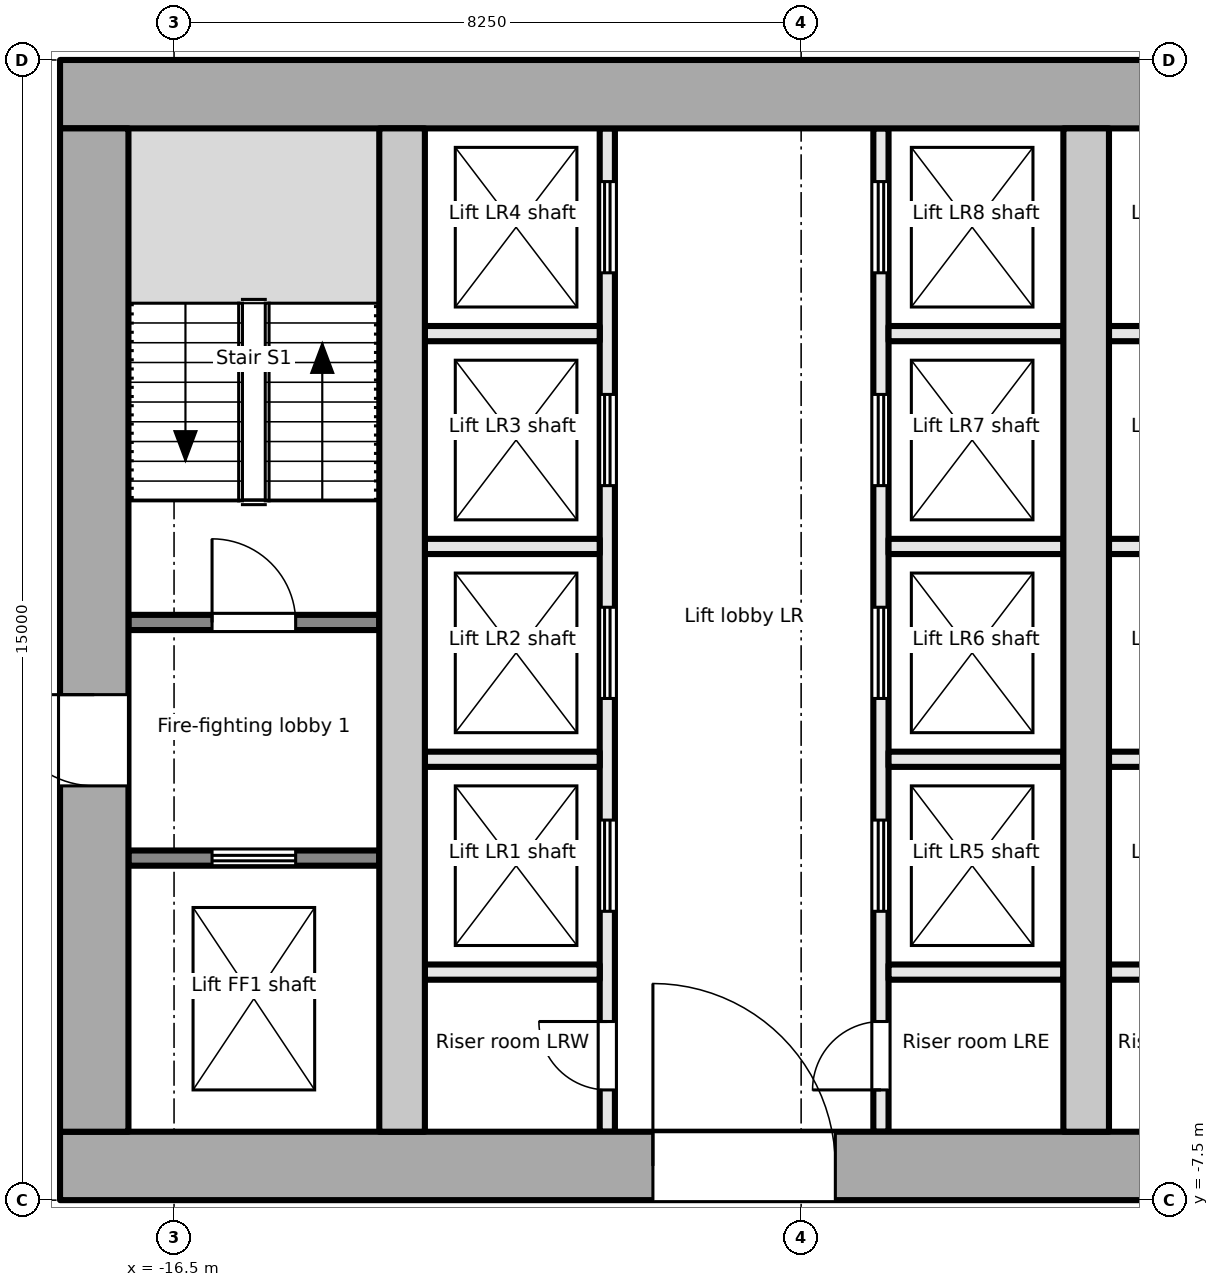
"""IFC4 building model, lengths in metres.
Left out: names, types, materials, properties, quantities, classifications, styles, units other than length and angle.
Written with IfcOpenShell. Run it as: python <this file> out.ifc"""

import sys

from ifc_helpers import new_model, si_unit, direction, frame, frame_2d, origin, place, context, subcontext, project, spatial, rectangle, extrude, element, fill, save


model = new_model("IFC4")
c1 = context("Model", 3, precision=1e-05, world=origin(), true_north=direction((0.0, 1.0)))
c2 = subcontext(c1, "Body", "Model", "MODEL_VIEW")
j1 = project(units=[si_unit("LENGTHUNIT", "METRE"), si_unit("PLANEANGLEUNIT", "RADIAN")], contexts=[c1])
p1 = place(None, origin())
s1 = spatial("IfcSite", under=j1, at=p1, CompositionType="ELEMENT")
p2 = place(p1, origin())
s2 = spatial("IfcBuilding", under=s1, at=p2, CompositionType="ELEMENT")
p3 = place(p2, frame((0.0, 0.0, 83.7)))
s3 = spatial("IfcBuildingStorey", under=s2, at=p3, CompositionType="ELEMENT", Elevation=83.7)
p4 = place(p3, frame((-18.0, -7.05, -0.2), z_axis=(0.0, 0.0, 1.0), x_axis=(1.0, 0.0, 0.0)))
e1 = element("IfcWall", 1, at=p4, inside=s3, PredefinedType="SHEAR", context=c2, shape_type="SweptSolid", body=[
    extrude(rectangle(XDim=36.0, YDim=0.9, at=frame_2d((18.0, 0.0))), origin(), (0.0, 0.0, 1.0), 4.0),
])
p5 = place(p4, frame((7.8, 0.0, 0.2)))
e2 = element("IfcOpeningElement", 2, at=p5, cuts=e1, PredefinedType="OPENING", context=c2, shape_type="SweptSolid", body=[
    extrude(rectangle(XDim=2.4, YDim=2.1, at=frame_2d((1.2, 1.05))), frame((0.0, 0.46, 0.0), z_axis=(0.0, -1.0, 0.0), x_axis=(1.0, 0.0, 0.0)), (0.0, 0.0, 1.0), 0.921),
])
p6 = place(p4, frame((17.4, 0.0, 0.2)))
e3 = element("IfcOpeningElement", 3, at=p6, cuts=e1, PredefinedType="OPENING", context=c2, shape_type="SweptSolid", body=[
    extrude(rectangle(XDim=1.2, YDim=2.1, at=frame_2d((0.6, 1.05))), frame((0.0, 0.46, 0.0), z_axis=(0.0, -1.0, 0.0), x_axis=(1.0, 0.0, 0.0)), (0.0, 0.0, 1.0), 0.921),
])
p7 = place(p4, frame((26.1, 0.0, 0.2)))
e4 = element("IfcOpeningElement", 4, at=p7, cuts=e1, PredefinedType="OPENING", context=c2, shape_type="SweptSolid", body=[
    extrude(rectangle(XDim=2.4, YDim=2.1, at=frame_2d((1.2, 1.05))), frame((0.0, 0.46, 0.0), z_axis=(0.0, -1.0, 0.0), x_axis=(1.0, 0.0, 0.0)), (0.0, 0.0, 1.0), 0.921),
])
p8 = place(p3, frame((-18.0, 7.05, -0.2), z_axis=(0.0, 0.0, 1.0), x_axis=(1.0, 0.0, 0.0)))
e5 = element("IfcWall", 5, at=p8, inside=s3, PredefinedType="SHEAR", context=c2, shape_type="SweptSolid", body=[
    extrude(rectangle(XDim=36.0, YDim=0.9, at=frame_2d((18.0, 0.0))), origin(), (0.0, 0.0, 1.0), 4.0),
])
p9 = place(p3, frame((-17.55, -6.6, -0.2), z_axis=(0.0, 0.0, 1.0), x_axis=(0.0, 1.0, 0.0)))
e6 = element("IfcWall", 6, at=p9, inside=s3, PredefinedType="SHEAR", context=c2, shape_type="SweptSolid", body=[
    extrude(rectangle(XDim=13.2, YDim=0.9, at=frame_2d((6.6, 0.0))), origin(), (0.0, 0.0, 1.0), 4.0),
])
p10 = place(p9, frame((4.55, 0.0, 0.2)))
e7 = element("IfcOpeningElement", 7, at=p10, cuts=e6, PredefinedType="OPENING", context=c2, shape_type="SweptSolid", body=[
    extrude(rectangle(XDim=1.2, YDim=2.1, at=frame_2d((0.6, 1.05))), frame((0.0, 0.46, 0.0), z_axis=(0.0, -1.0, 0.0), x_axis=(1.0, 0.0, 0.0)), (0.0, 0.0, 1.0), 0.921),
])
for number, where, z_axis, x_axis in (
    (8, (-13.5, -6.6, -0.2), (0.0, 0.0, 1.0), (0.0, 1.0, 0.0)),
    (9, (-4.5, -6.6, -0.2), (0.0, 0.0, 1.0), (0.0, 1.0, 0.0)),
):
    element("IfcWall", number, at=place(p3, frame(where, z_axis=z_axis, x_axis=x_axis)), inside=s3, PredefinedType="SHEAR", context=c2, shape_type="SweptSolid", body=[
        extrude(rectangle(XDim=13.2, YDim=0.6, at=frame_2d((6.6, 0.0))), origin(), (0.0, 0.0, 1.0), 4.0),
    ])
p11 = place(p3, frame((-17.1, -3.0, 0.0), z_axis=(0.0, 0.0, 1.0), x_axis=(1.0, 0.0, 0.0)))
e10 = element("IfcWall", 10, at=p11, inside=s3, PredefinedType="PARTITIONING", context=c2, shape_type="SweptSolid", body=[
    extrude(rectangle(XDim=3.3, YDim=0.2, at=frame_2d((1.65, 0.0))), origin(), (0.0, 0.0, 1.0), 3.8),
])
p12 = place(p11, frame((1.1, 0.0, 0.0)))
e11 = element("IfcOpeningElement", 11, at=p12, cuts=e10, PredefinedType="OPENING", context=c2, shape_type="SweptSolid", body=[
    extrude(rectangle(XDim=1.1, YDim=2.1, at=frame_2d((0.55, 1.05))), frame((0.0, 0.111, 0.0), z_axis=(0.0, -1.0, 0.0), x_axis=(1.0, 0.0, 0.0)), (0.0, 0.0, 1.0), 0.221),
])
p13 = place(p3, frame((-17.1, 0.1, 0.0), z_axis=(0.0, 0.0, 1.0), x_axis=(1.0, 0.0, 0.0)))
e12 = element("IfcWall", 12, at=p13, inside=s3, PredefinedType="PARTITIONING", context=c2, shape_type="SweptSolid", body=[
    extrude(rectangle(XDim=3.3, YDim=0.2, at=frame_2d((1.65, 0.0))), origin(), (0.0, 0.0, 1.0), 3.8),
])
p14 = place(p13, frame((1.1, 0.0, 0.0)))
e13 = element("IfcOpeningElement", 13, at=p14, cuts=e12, PredefinedType="OPENING", context=c2, shape_type="SweptSolid", body=[
    extrude(rectangle(XDim=1.1, YDim=2.1, at=frame_2d((0.55, 1.05))), frame((0.0, 0.111, 0.0), z_axis=(0.0, -1.0, 0.0), x_axis=(1.0, 0.0, 0.0)), (0.0, 0.0, 1.0), 0.221),
])
p15 = place(p3, frame((-10.8, -6.6, 0.0), z_axis=(0.0, 0.0, 1.0), x_axis=(0.0, 1.0, 0.0)))
e14 = element("IfcWall", 14, at=p15, inside=s3, PredefinedType="PARTITIONING", context=c2, shape_type="SweptSolid", body=[
    extrude(rectangle(XDim=13.2, YDim=0.2, at=frame_2d((6.6, 0.0))), origin(), (0.0, 0.0, 1.0), 3.8),
])
p16 = place(p15, frame((0.55, 0.0, 0.0)))
e15 = element("IfcOpeningElement", 15, at=p16, cuts=e14, PredefinedType="OPENING", context=c2, shape_type="SweptSolid", body=[
    extrude(rectangle(XDim=0.9, YDim=2.1, at=frame_2d((0.45, 1.05))), frame((0.0, 0.111, 0.0), z_axis=(0.0, -1.0, 0.0), x_axis=(1.0, 0.0, 0.0)), (0.0, 0.0, 1.0), 0.221),
])
p17 = place(p15, frame((2.9, 0.0, 0.0)))
e16 = element("IfcOpeningElement", 16, at=p17, cuts=e14, PredefinedType="OPENING", context=c2, shape_type="SweptSolid", body=[
    extrude(rectangle(XDim=1.2, YDim=2.1, at=frame_2d((0.6, 1.05))), frame((0.0, 0.111, 0.0), z_axis=(0.0, -1.0, 0.0), x_axis=(1.0, 0.0, 0.0)), (0.0, 0.0, 1.0), 0.221),
])
p18 = place(p15, frame((5.7, 0.0, 0.0)))
e17 = element("IfcOpeningElement", 17, at=p18, cuts=e14, PredefinedType="OPENING", context=c2, shape_type="SweptSolid", body=[
    extrude(rectangle(XDim=1.2, YDim=2.1, at=frame_2d((0.6, 1.05))), frame((0.0, 0.111, 0.0), z_axis=(0.0, -1.0, 0.0), x_axis=(1.0, 0.0, 0.0)), (0.0, 0.0, 1.0), 0.221),
])
p19 = place(p15, frame((8.5, 0.0, 0.0)))
e18 = element("IfcOpeningElement", 18, at=p19, cuts=e14, PredefinedType="OPENING", context=c2, shape_type="SweptSolid", body=[
    extrude(rectangle(XDim=1.2, YDim=2.1, at=frame_2d((0.6, 1.05))), frame((0.0, 0.111, 0.0), z_axis=(0.0, -1.0, 0.0), x_axis=(1.0, 0.0, 0.0)), (0.0, 0.0, 1.0), 0.221),
])
p20 = place(p15, frame((11.3, 0.0, 0.0)))
e19 = element("IfcOpeningElement", 19, at=p20, cuts=e14, PredefinedType="OPENING", context=c2, shape_type="SweptSolid", body=[
    extrude(rectangle(XDim=1.2, YDim=2.1, at=frame_2d((0.6, 1.05))), frame((0.0, 0.111, 0.0), z_axis=(0.0, -1.0, 0.0), x_axis=(1.0, 0.0, 0.0)), (0.0, 0.0, 1.0), 0.221),
])
p21 = place(p3, frame((-7.2, -6.6, 0.0), z_axis=(0.0, 0.0, 1.0), x_axis=(0.0, 1.0, 0.0)))
e20 = element("IfcWall", 20, at=p21, inside=s3, PredefinedType="PARTITIONING", context=c2, shape_type="SweptSolid", body=[
    extrude(rectangle(XDim=13.2, YDim=0.2, at=frame_2d((6.6, 0.0))), origin(), (0.0, 0.0, 1.0), 3.8),
])
p22 = place(p21, frame((0.55, 0.0, 0.0)))
e21 = element("IfcOpeningElement", 21, at=p22, cuts=e20, PredefinedType="OPENING", context=c2, shape_type="SweptSolid", body=[
    extrude(rectangle(XDim=0.9, YDim=2.1, at=frame_2d((0.45, 1.05))), frame((0.0, 0.111, 0.0), z_axis=(0.0, -1.0, 0.0), x_axis=(1.0, 0.0, 0.0)), (0.0, 0.0, 1.0), 0.221),
])
p23 = place(p21, frame((2.9, 0.0, 0.0)))
e22 = element("IfcOpeningElement", 22, at=p23, cuts=e20, PredefinedType="OPENING", context=c2, shape_type="SweptSolid", body=[
    extrude(rectangle(XDim=1.2, YDim=2.1, at=frame_2d((0.6, 1.05))), frame((0.0, 0.111, 0.0), z_axis=(0.0, -1.0, 0.0), x_axis=(1.0, 0.0, 0.0)), (0.0, 0.0, 1.0), 0.221),
])
p24 = place(p21, frame((5.7, 0.0, 0.0)))
e23 = element("IfcOpeningElement", 23, at=p24, cuts=e20, PredefinedType="OPENING", context=c2, shape_type="SweptSolid", body=[
    extrude(rectangle(XDim=1.2, YDim=2.1, at=frame_2d((0.6, 1.05))), frame((0.0, 0.111, 0.0), z_axis=(0.0, -1.0, 0.0), x_axis=(1.0, 0.0, 0.0)), (0.0, 0.0, 1.0), 0.221),
])
p25 = place(p21, frame((8.5, 0.0, 0.0)))
e24 = element("IfcOpeningElement", 24, at=p25, cuts=e20, PredefinedType="OPENING", context=c2, shape_type="SweptSolid", body=[
    extrude(rectangle(XDim=1.2, YDim=2.1, at=frame_2d((0.6, 1.05))), frame((0.0, 0.111, 0.0), z_axis=(0.0, -1.0, 0.0), x_axis=(1.0, 0.0, 0.0)), (0.0, 0.0, 1.0), 0.221),
])
p26 = place(p21, frame((11.3, 0.0, 0.0)))
e25 = element("IfcOpeningElement", 25, at=p26, cuts=e20, PredefinedType="OPENING", context=c2, shape_type="SweptSolid", body=[
    extrude(rectangle(XDim=1.2, YDim=2.1, at=frame_2d((0.6, 1.05))), frame((0.0, 0.111, 0.0), z_axis=(0.0, -1.0, 0.0), x_axis=(1.0, 0.0, 0.0)), (0.0, 0.0, 1.0), 0.221),
])
for number, where, z_axis, x_axis in (
    (26, (-13.2, -1.7, 0.0), (0.0, 0.0, 1.0), (1.0, 0.0, 0.0)),
    (27, (-13.2, 1.1, 0.0), (0.0, 0.0, 1.0), (1.0, 0.0, 0.0)),
    (28, (-13.2, 3.9, 0.0), (0.0, 0.0, 1.0), (1.0, 0.0, 0.0)),
    (29, (-13.2, -4.5, 0.0), (0.0, 0.0, 1.0), (1.0, 0.0, 0.0)),
    (30, (-7.1, -1.7, 0.0), (0.0, 0.0, 1.0), (1.0, 0.0, 0.0)),
    (31, (-7.1, 1.1, 0.0), (0.0, 0.0, 1.0), (1.0, 0.0, 0.0)),
    (32, (-7.1, 3.9, 0.0), (0.0, 0.0, 1.0), (1.0, 0.0, 0.0)),
    (33, (-7.1, -4.5, 0.0), (0.0, 0.0, 1.0), (1.0, 0.0, 0.0)),
    (34, (-4.2, -1.7, 0.0), (0.0, 0.0, 1.0), (1.0, 0.0, 0.0)),
    (35, (-4.2, 1.1, 0.0), (0.0, 0.0, 1.0), (1.0, 0.0, 0.0)),
    (36, (-4.2, 3.9, 0.0), (0.0, 0.0, 1.0), (1.0, 0.0, 0.0)),
    (37, (-4.2, -4.5, 0.0), (0.0, 0.0, 1.0), (1.0, 0.0, 0.0)),
):
    element("IfcWall", number, at=place(p3, frame(where, z_axis=z_axis, x_axis=x_axis)), inside=s3, PredefinedType="PARTITIONING", context=c2, shape_type="SweptSolid", body=[
        extrude(rectangle(XDim=2.3, YDim=0.2, at=frame_2d((1.15, 0.0))), origin(), (0.0, 0.0, 1.0), 3.8),
    ])
p27 = place(p12, origin())
e38 = element("IfcDoor", 38, at=p27, inside=s3, OperationType="DOUBLE_DOOR_SLIDING", PredefinedType="DOOR", context=c2, shape_type="SweptSolid", body=[
    extrude(rectangle(XDim=1.1, YDim=2.1, at=frame_2d((0.55, 1.05))), frame((0.0, 0.025, 0.0), z_axis=(0.0, -1.0, 0.0), x_axis=(1.0, 0.0, 0.0)), (0.0, 0.0, 1.0), 0.05),
])
fill(e11, e38)
p28 = place(p10, origin())
e39 = element("IfcDoor", 39, at=p28, inside=s3, OperationType="SINGLE_SWING_RIGHT", PredefinedType="DOOR", context=c2, shape_type="SweptSolid", body=[
    extrude(rectangle(XDim=1.2, YDim=2.1, at=frame_2d((0.6, 1.05))), frame((0.0, 0.025, 0.0), z_axis=(0.0, -1.0, 0.0), x_axis=(1.0, 0.0, 0.0)), (0.0, 0.0, 1.0), 0.05),
])
fill(e7, e39)
p29 = place(p14, origin())
e40 = element("IfcDoor", 40, at=p29, inside=s3, OperationType="SINGLE_SWING_LEFT", PredefinedType="DOOR", context=c2, shape_type="SweptSolid", body=[
    extrude(rectangle(XDim=1.1, YDim=2.1, at=frame_2d((0.55, 1.05))), frame((0.0, 0.025, 0.0), z_axis=(0.0, -1.0, 0.0), x_axis=(1.0, 0.0, 0.0)), (0.0, 0.0, 1.0), 0.05),
])
fill(e13, e40)
p30 = place(p16, origin())
e41 = element("IfcDoor", 41, at=p30, inside=s3, OperationType="SINGLE_SWING_RIGHT", PredefinedType="DOOR", context=c2, shape_type="SweptSolid", body=[
    extrude(rectangle(XDim=0.9, YDim=2.1, at=frame_2d((0.45, 1.05))), frame((0.0, 0.025, 0.0), z_axis=(0.0, -1.0, 0.0), x_axis=(1.0, 0.0, 0.0)), (0.0, 0.0, 1.0), 0.05),
])
fill(e15, e41)
p31 = place(p17, origin())
e42 = element("IfcDoor", 42, at=p31, inside=s3, OperationType="DOUBLE_DOOR_SLIDING", PredefinedType="DOOR", context=c2, shape_type="SweptSolid", body=[
    extrude(rectangle(XDim=1.2, YDim=2.1, at=frame_2d((0.6, 1.05))), frame((0.0, 0.025, 0.0), z_axis=(0.0, -1.0, 0.0), x_axis=(1.0, 0.0, 0.0)), (0.0, 0.0, 1.0), 0.05),
])
fill(e16, e42)
p32 = place(p18, origin())
e43 = element("IfcDoor", 43, at=p32, inside=s3, OperationType="DOUBLE_DOOR_SLIDING", PredefinedType="DOOR", context=c2, shape_type="SweptSolid", body=[
    extrude(rectangle(XDim=1.2, YDim=2.1, at=frame_2d((0.6, 1.05))), frame((0.0, 0.025, 0.0), z_axis=(0.0, -1.0, 0.0), x_axis=(1.0, 0.0, 0.0)), (0.0, 0.0, 1.0), 0.05),
])
fill(e17, e43)
p33 = place(p19, origin())
e44 = element("IfcDoor", 44, at=p33, inside=s3, OperationType="DOUBLE_DOOR_SLIDING", PredefinedType="DOOR", context=c2, shape_type="SweptSolid", body=[
    extrude(rectangle(XDim=1.2, YDim=2.1, at=frame_2d((0.6, 1.05))), frame((0.0, 0.025, 0.0), z_axis=(0.0, -1.0, 0.0), x_axis=(1.0, 0.0, 0.0)), (0.0, 0.0, 1.0), 0.05),
])
fill(e18, e44)
p34 = place(p20, origin())
e45 = element("IfcDoor", 45, at=p34, inside=s3, OperationType="DOUBLE_DOOR_SLIDING", PredefinedType="DOOR", context=c2, shape_type="SweptSolid", body=[
    extrude(rectangle(XDim=1.2, YDim=2.1, at=frame_2d((0.6, 1.05))), frame((0.0, 0.025, 0.0), z_axis=(0.0, -1.0, 0.0), x_axis=(1.0, 0.0, 0.0)), (0.0, 0.0, 1.0), 0.05),
])
fill(e19, e45)
p35 = place(p22, origin())
e46 = element("IfcDoor", 46, at=p35, inside=s3, OperationType="SINGLE_SWING_LEFT", PredefinedType="DOOR", context=c2, shape_type="SweptSolid", body=[
    extrude(rectangle(XDim=0.9, YDim=2.1, at=frame_2d((0.45, 1.05))), frame((0.0, 0.025, 0.0), z_axis=(0.0, -1.0, 0.0), x_axis=(1.0, 0.0, 0.0)), (0.0, 0.0, 1.0), 0.05),
])
fill(e21, e46)
p36 = place(p23, origin())
e47 = element("IfcDoor", 47, at=p36, inside=s3, OperationType="DOUBLE_DOOR_SLIDING", PredefinedType="DOOR", context=c2, shape_type="SweptSolid", body=[
    extrude(rectangle(XDim=1.2, YDim=2.1, at=frame_2d((0.6, 1.05))), frame((0.0, 0.025, 0.0), z_axis=(0.0, -1.0, 0.0), x_axis=(1.0, 0.0, 0.0)), (0.0, 0.0, 1.0), 0.05),
])
fill(e22, e47)
p37 = place(p24, origin())
e48 = element("IfcDoor", 48, at=p37, inside=s3, OperationType="DOUBLE_DOOR_SLIDING", PredefinedType="DOOR", context=c2, shape_type="SweptSolid", body=[
    extrude(rectangle(XDim=1.2, YDim=2.1, at=frame_2d((0.6, 1.05))), frame((0.0, 0.025, 0.0), z_axis=(0.0, -1.0, 0.0), x_axis=(1.0, 0.0, 0.0)), (0.0, 0.0, 1.0), 0.05),
])
fill(e23, e48)
p38 = place(p25, origin())
e49 = element("IfcDoor", 49, at=p38, inside=s3, OperationType="DOUBLE_DOOR_SLIDING", PredefinedType="DOOR", context=c2, shape_type="SweptSolid", body=[
    extrude(rectangle(XDim=1.2, YDim=2.1, at=frame_2d((0.6, 1.05))), frame((0.0, 0.025, 0.0), z_axis=(0.0, -1.0, 0.0), x_axis=(1.0, 0.0, 0.0)), (0.0, 0.0, 1.0), 0.05),
])
fill(e24, e49)
p39 = place(p26, origin())
e50 = element("IfcDoor", 50, at=p39, inside=s3, OperationType="DOUBLE_DOOR_SLIDING", PredefinedType="DOOR", context=c2, shape_type="SweptSolid", body=[
    extrude(rectangle(XDim=1.2, YDim=2.1, at=frame_2d((0.6, 1.05))), frame((0.0, 0.025, 0.0), z_axis=(0.0, -1.0, 0.0), x_axis=(1.0, 0.0, 0.0)), (0.0, 0.0, 1.0), 0.05),
])
fill(e25, e50)
p40 = place(p5, origin())
e51 = element("IfcDoor", 51, at=p40, inside=s3, OperationType="DOUBLE_DOOR_DOUBLE_SWING", PredefinedType="DOOR", context=c2, shape_type="SweptSolid", body=[
    extrude(rectangle(XDim=2.4, YDim=2.1, at=frame_2d((1.2, 1.05))), frame((0.0, 0.025, 0.0), z_axis=(0.0, -1.0, 0.0), x_axis=(1.0, 0.0, 0.0)), (0.0, 0.0, 1.0), 0.05),
])
fill(e2, e51)
save(model, sys.argv[1])
